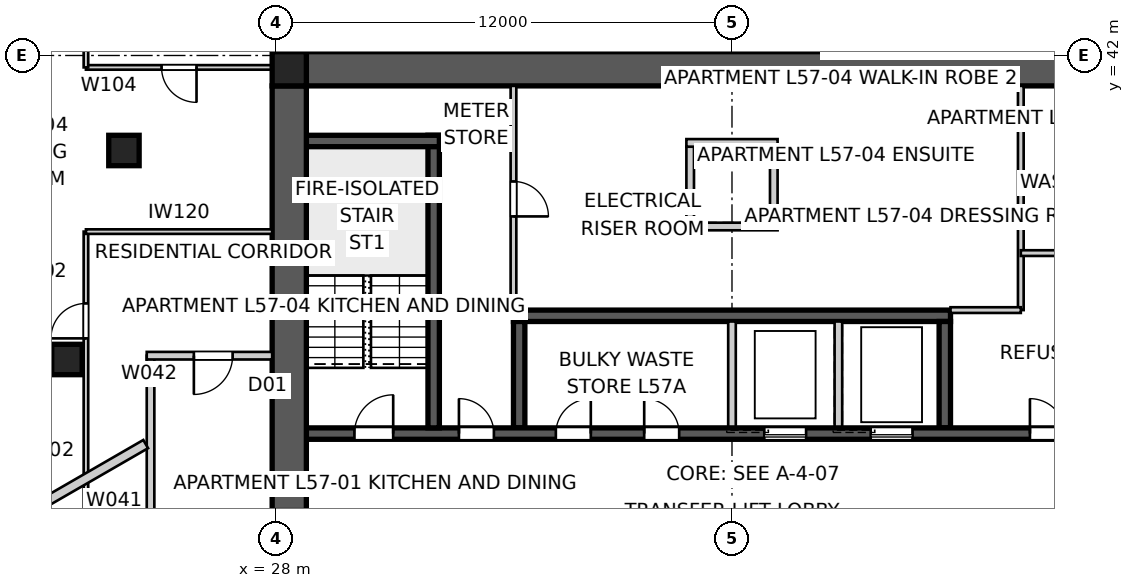
"""IFC4 building model, lengths in metres.
Left out: names, types, materials, properties, quantities, classifications, styles, units other than length and angle.
Written with IfcOpenShell. Run it as: python <this file> out.ifc"""

import sys

from ifc_helpers import new_model, si_unit, direction, frame, frame_2d, origin, origin_2d, place, context, subcontext, project, spatial, polyline, rectangle, outline, extrude, element, fill, save


model = new_model("IFC4")
c1 = context("Model", 3, precision=1e-05, world=origin(), true_north=direction((0.0, 1.0)))
c2 = subcontext(c1, "Body", "Model", "MODEL_VIEW")
j1 = project(units=[si_unit("LENGTHUNIT", "METRE"), si_unit("PLANEANGLEUNIT", "RADIAN")], contexts=[c1])
p1 = place(None, origin())
s1 = spatial("IfcSite", under=j1, at=p1, CompositionType="ELEMENT")
p2 = place(p1, origin())
s2 = spatial("IfcBuilding", under=s1, at=p2, CompositionType="ELEMENT")
p3 = place(p2, frame((0.0, 0.0, 208.2)))
s3 = spatial("IfcBuildingStorey", under=s2, at=p3, CompositionType="ELEMENT", Elevation=208.2)
p4 = place(p3, frame((28.8, 41.65, 0.0), z_axis=(0.0, 0.0, 1.0), x_axis=(1.0, 0.0, 0.0)))
e1 = element("IfcWall", 1, at=p4, inside=s3, PredefinedType="SHEAR", context=c2, shape_type="SweptSolid", body=[
    extrude(outline(polyline([(0.0, -0.45), (22.4, -0.45), (22.4, -0.025), (22.85, -0.025), (22.85, 0.025), (22.4, 0.025), (22.4, 0.45), (0.0, 0.45), (0.0, 0.025), (-0.45, 0.025), (-0.45, -0.025), (0.0, -0.025), (0.0, -0.45)])), origin(), (0.0, 0.0, 1.0), 3.4),
])
p5 = place(p3, frame((28.35, 41.2, 0.0), z_axis=(0.0, 0.0, 1.0), x_axis=(0.0, -1.0, 0.0)))
e2 = element("IfcWall", 2, at=p5, inside=s3, PredefinedType="SHEAR", context=c2, shape_type="SweptSolid", body=[
    extrude(outline(polyline([(0.0, -0.45), (22.4, -0.45), (22.4, -0.025), (22.85, -0.025), (22.85, 0.025), (22.4, 0.025), (22.4, 0.45), (0.0, 0.45), (0.0, 0.025), (-0.45, 0.025), (-0.45, -0.025), (0.0, -0.025), (0.0, -0.45)])), origin(), (0.0, 0.0, 1.0), 3.4),
])
p6 = place(p5, frame((11.14, 0.0, 0.0)))
e3 = element("IfcOpeningElement", 3, at=p6, cuts=e2, PredefinedType="OPENING", context=c2, shape_type="SweptSolid", body=[
    extrude(rectangle(XDim=1.02, YDim=2.4, at=frame_2d((0.51, 1.2))), frame((0.0, 0.46, 0.0), z_axis=(0.0, -1.0, 0.0), x_axis=(1.0, 0.0, 0.0)), (0.0, 0.0, 1.0), 0.92),
])
p7 = place(p3, frame((28.8, 32.05, 0.0), z_axis=(0.0, 0.0, 1.0), x_axis=(1.0, 0.0, 0.0)))
e4 = element("IfcWall", 4, at=p7, inside=s3, PredefinedType="SHEAR", context=c2, shape_type="SweptSolid", body=[
    extrude(rectangle(XDim=22.4, YDim=0.3, at=frame_2d((11.2, 0.0))), origin(), (0.0, 0.0, 1.0), 3.4),
])
p8 = place(p7, frame((19.04, 0.0, 0.0)))
e5 = element("IfcOpeningElement", 5, at=p8, cuts=e4, PredefinedType="OPENING", context=c2, shape_type="SweptSolid", body=[
    extrude(rectangle(XDim=0.92, YDim=2.1, at=frame_2d((0.46, 1.05))), frame((0.0, 0.16, 0.0), z_axis=(0.0, -1.0, 0.0), x_axis=(1.0, 0.0, 0.0)), (0.0, 0.0, 1.0), 0.32),
])
p9 = place(p7, frame((1.265, 0.0, 0.0)))
e6 = element("IfcOpeningElement", 6, at=p9, cuts=e4, PredefinedType="OPENING", context=c2, shape_type="SweptSolid", body=[
    extrude(rectangle(XDim=1.02, YDim=2.1, at=frame_2d((0.51, 1.05))), frame((0.0, 0.16, 0.0), z_axis=(0.0, -1.0, 0.0), x_axis=(1.0, 0.0, 0.0)), (0.0, 0.0, 1.0), 0.32),
])
p10 = place(p7, frame((4.015, 0.0, 0.0)))
e7 = element("IfcOpeningElement", 7, at=p10, cuts=e4, PredefinedType="OPENING", context=c2, shape_type="SweptSolid", body=[
    extrude(rectangle(XDim=0.92, YDim=2.1, at=frame_2d((0.46, 1.05))), frame((0.0, 0.16, 0.0), z_axis=(0.0, -1.0, 0.0), x_axis=(1.0, 0.0, 0.0)), (0.0, 0.0, 1.0), 0.32),
])
p11 = place(p7, frame((6.565, 0.0, 0.0)))
e8 = element("IfcOpeningElement", 8, at=p11, cuts=e4, PredefinedType="OPENING", context=c2, shape_type="SweptSolid", body=[
    extrude(rectangle(XDim=0.92, YDim=2.1, at=frame_2d((0.46, 1.05))), frame((0.0, 0.16, 0.0), z_axis=(0.0, -1.0, 0.0), x_axis=(1.0, 0.0, 0.0)), (0.0, 0.0, 1.0), 0.32),
])
p12 = place(p7, frame((8.89, 0.0, 0.0)))
e9 = element("IfcOpeningElement", 9, at=p12, cuts=e4, PredefinedType="OPENING", context=c2, shape_type="SweptSolid", body=[
    extrude(rectangle(XDim=0.92, YDim=2.1, at=frame_2d((0.46, 1.05))), frame((0.0, 0.16, 0.0), z_axis=(0.0, -1.0, 0.0), x_axis=(1.0, 0.0, 0.0)), (0.0, 0.0, 1.0), 0.32),
])
p13 = place(p7, frame((12.05, 0.0, 0.0)))
e10 = element("IfcOpeningElement", 10, at=p13, cuts=e4, PredefinedType="OPENING", context=c2, shape_type="SweptSolid", body=[
    extrude(rectangle(XDim=1.1, YDim=2.1, at=frame_2d((0.55, 1.05))), frame((0.0, 0.16, 0.0), z_axis=(0.0, -1.0, 0.0), x_axis=(1.0, 0.0, 0.0)), (0.0, 0.0, 1.0), 0.32),
])
p14 = place(p7, frame((14.85, 0.0, 0.0)))
e11 = element("IfcOpeningElement", 11, at=p14, cuts=e4, PredefinedType="OPENING", context=c2, shape_type="SweptSolid", body=[
    extrude(rectangle(XDim=1.1, YDim=2.1, at=frame_2d((0.55, 1.05))), frame((0.0, 0.16, 0.0), z_axis=(0.0, -1.0, 0.0), x_axis=(1.0, 0.0, 0.0)), (0.0, 0.0, 1.0), 0.32),
])
p15 = place(p3, frame((34.25, 35.15, 0.0), z_axis=(0.0, 0.0, 1.0), x_axis=(1.0, 0.0, 0.0)))
e12 = element("IfcWall", 12, at=p15, inside=s3, PredefinedType="SHEAR", context=c2, shape_type="SweptSolid", body=[
    extrude(rectangle(XDim=11.5, YDim=0.3, at=frame_2d((5.75, 0.0))), origin(), (0.0, 0.0, 1.0), 3.4),
])
p16 = place(p3, frame((34.4, 32.2, 0.0), z_axis=(0.0, 0.0, 1.0), x_axis=(0.0, 1.0, 0.0)))
e13 = element("IfcWall", 13, at=p16, inside=s3, PredefinedType="SHEAR", context=c2, shape_type="SweptSolid", body=[
    extrude(rectangle(XDim=2.8, YDim=0.3, at=frame_2d((1.4, 0.0))), origin(), (0.0, 0.0, 1.0), 3.4),
])
for number, where, z_axis, x_axis in (
    (14, (40.0, 32.2, 0.0), (0.0, 0.0, 1.0), (0.0, 1.0, 0.0)),
    (15, (42.8, 32.2, 0.0), (0.0, 0.0, 1.0), (0.0, 1.0, 0.0)),
):
    element("IfcWall", number, at=place(p3, frame(where, z_axis=z_axis, x_axis=x_axis)), inside=s3, PredefinedType="SOLIDWALL", context=c2, shape_type="SweptSolid", body=[
        extrude(rectangle(XDim=2.8, YDim=0.2, at=frame_2d((1.4, 0.0))), origin(), (0.0, 0.0, 1.0), 3.4),
    ])
p17 = place(p3, frame((45.6, 32.2, 0.0), z_axis=(0.0, 0.0, 1.0), x_axis=(0.0, 1.0, 0.0)))
e16 = element("IfcWall", 16, at=p17, inside=s3, PredefinedType="SHEAR", context=c2, shape_type="SweptSolid", body=[
    extrude(rectangle(XDim=2.8, YDim=0.3, at=frame_2d((1.4, 0.0))), origin(), (0.0, 0.0, 1.0), 3.4),
])
p18 = place(p3, frame((32.15, 32.2, 0.0), z_axis=(0.0, 0.0, 1.0), x_axis=(0.0, 1.0, 0.0)))
e17 = element("IfcWall", 17, at=p18, inside=s3, PredefinedType="SHEAR", context=c2, shape_type="SweptSolid", body=[
    extrude(rectangle(XDim=7.7, YDim=0.3, at=frame_2d((3.85, 0.0))), origin(), (0.0, 0.0, 1.0), 3.4),
])
p19 = place(p3, frame((28.8, 39.75, 0.0), z_axis=(0.0, 0.0, 1.0), x_axis=(1.0, 0.0, 0.0)))
e18 = element("IfcWall", 18, at=p19, inside=s3, PredefinedType="SHEAR", context=c2, shape_type="SweptSolid", body=[
    extrude(rectangle(XDim=3.5, YDim=0.3, at=frame_2d((1.75, 0.0))), origin(), (0.0, 0.0, 1.0), 3.4),
])
for number, where, z_axis, x_axis in (
    (19, (38.9, 37.6, 0.0), (0.0, 0.0, 1.0), (0.0, 1.0, 0.0)),
    (20, (41.1, 37.6, 0.0), (0.0, 0.0, 1.0), (0.0, 1.0, 0.0)),
):
    element("IfcWall", number, at=place(p3, frame(where, z_axis=z_axis, x_axis=x_axis)), inside=s3, PredefinedType="SOLIDWALL", context=c2, shape_type="SweptSolid", body=[
        extrude(rectangle(XDim=2.0, YDim=0.2, at=frame_2d((1.0, 0.0))), origin(), (0.0, 0.0, 1.0), 3.4),
    ])
for number, where, z_axis, x_axis in (
    (21, (38.8, 37.5, 0.0), (0.0, 0.0, 1.0), (1.0, 0.0, 0.0)),
    (22, (38.8, 39.7, 0.0), (0.0, 0.0, 1.0), (1.0, 0.0, 0.0)),
):
    element("IfcWall", number, at=place(p3, frame(where, z_axis=z_axis, x_axis=x_axis)), inside=s3, PredefinedType="SOLIDWALL", context=c2, shape_type="SweptSolid", body=[
        extrude(rectangle(XDim=2.4, YDim=0.2, at=frame_2d((1.2, 0.0))), origin(), (0.0, 0.0, 1.0), 3.4),
    ])
p20 = place(p3, frame((28.35, 41.65, 0.0), z_axis=(0.0, 0.0, 1.0), x_axis=(1.0, 0.0, 0.0)))
e23 = element("IfcColumn", 23, at=p20, inside=s3, PredefinedType="COLUMN", context=c2, shape_type="SweptSolid", body=[
    extrude(rectangle(XDim=0.9, YDim=0.9, at=origin_2d()), origin(), (0.0, 0.0, 1.0), 3.4),
])
for number, where, z_axis, x_axis in (
    (24, (24.0, 39.5, 0.0), (0.0, 0.0, 1.0), (1.0, 0.0, 0.0)),
    (25, (22.5, 34.0, 0.0), (0.0, 0.0, 1.0), (1.0, 0.0, 0.0)),
):
    element("IfcColumn", number, at=place(p3, frame(where, z_axis=z_axis, x_axis=x_axis)), inside=s3, PredefinedType="COLUMN", context=c2, shape_type="SweptSolid", body=[
        extrude(rectangle(XDim=0.8, YDim=0.8, at=origin_2d()), origin(), (0.0, 0.0, 1.0), 3.4),
    ])
p21 = place(p3, frame((24.7, 25.9, 0.0), z_axis=(0.0, 0.0, 1.0), x_axis=(0.0, 1.0, 0.0)))
e26 = element("IfcWall", 26, at=p21, inside=s3, PredefinedType="PARTITIONING", context=c2, shape_type="SweptSolid", body=[
    extrude(rectangle(XDim=8.2, YDim=0.2, at=frame_2d((4.1, 0.0))), origin(), (0.0, 0.0, 1.0), 3.25),
])
p22 = place(p21, frame((2.687, 0.0, 0.0)))
e27 = element("IfcOpeningElement", 27, at=p22, cuts=e26, PredefinedType="OPENING", context=c2, shape_type="SweptSolid", body=[
    extrude(rectangle(XDim=1.02, YDim=2.34, at=frame_2d((0.51, 1.17))), frame((0.0, 0.11, 0.0), z_axis=(0.0, -1.0, 0.0), x_axis=(1.0, 0.0, 0.0)), (0.0, 0.0, 1.0), 0.22),
])
p23 = place(p3, frame((27.9, 34.1, 0.0), z_axis=(0.0, 0.0, 1.0), x_axis=(-1.0, 0.0, 0.0)))
e28 = element("IfcWall", 28, at=p23, inside=s3, PredefinedType="PARTITIONING", context=c2, shape_type="SweptSolid", body=[
    extrude(rectangle(XDim=3.3, YDim=0.2, at=frame_2d((1.65, 0.0))), origin(), (0.0, 0.0, 1.0), 3.25),
])
p24 = place(p23, frame((1.04, 0.0, 0.0)))
e29 = element("IfcOpeningElement", 29, at=p24, cuts=e28, PredefinedType="OPENING", context=c2, shape_type="SweptSolid", body=[
    extrude(rectangle(XDim=1.02, YDim=2.34, at=frame_2d((0.51, 1.17))), frame((0.0, 0.11, 0.0), z_axis=(0.0, -1.0, 0.0), x_axis=(1.0, 0.0, 0.0)), (0.0, 0.0, 1.0), 0.22),
])
p25 = place(p3, frame((15.889, 26.761, 0.0), z_axis=(0.0, 0.0, 1.0), x_axis=(0.866024190901, 0.50000210077, 0.0)))
e30 = element("IfcWall", 30, at=p25, inside=s3, PredefinedType="PARTITIONING", context=c2, shape_type="SweptSolid", body=[
    extrude(rectangle(XDim=10.026, YDim=0.25, at=frame_2d((5.013, 0.0))), origin(), (0.0, 0.0, 1.0), 3.25),
])
p26 = place(p3, frame((34.25, 41.2, 0.0), z_axis=(0.0, 0.0, 1.0), x_axis=(0.0, -1.0, 0.0)))
e31 = element("IfcWall", 31, at=p26, inside=s3, PredefinedType="SOLIDWALL", context=c2, shape_type="SweptSolid", body=[
    extrude(rectangle(XDim=5.95, YDim=0.15, at=frame_2d((2.975, 0.0))), origin(), (0.0, 0.0, 1.0), 3.25),
])
p27 = place(p26, frame((2.515, 0.0, 0.0)))
e32 = element("IfcOpeningElement", 32, at=p27, cuts=e31, PredefinedType="OPENING", context=c2, shape_type="SweptSolid", body=[
    extrude(rectangle(XDim=0.92, YDim=2.1, at=frame_2d((0.46, 1.05))), frame((0.0, 0.085, 0.0), z_axis=(0.0, -1.0, 0.0), x_axis=(1.0, 0.0, 0.0)), (0.0, 0.0, 1.0), 0.17),
])
p28 = place(p3, frame((47.6, 41.2, 0.0), z_axis=(0.0, 0.0, 1.0), x_axis=(0.0, -1.0, 0.0)))
e33 = element("IfcWall", 33, at=p28, inside=s3, PredefinedType="SOLIDWALL", context=c2, shape_type="SweptSolid", body=[
    extrude(rectangle(XDim=5.9, YDim=0.15, at=frame_2d((2.95, 0.0))), origin(), (0.0, 0.0, 1.0), 3.25),
])
p29 = place(p3, frame((47.6, 35.3, 0.0), z_axis=(0.0, 0.0, 1.0), x_axis=(-1.0, 0.0, 0.0)))
e34 = element("IfcWall", 34, at=p29, inside=s3, PredefinedType="SOLIDWALL", context=c2, shape_type="SweptSolid", body=[
    extrude(rectangle(XDim=1.85, YDim=0.15, at=frame_2d((0.925, 0.0))), origin(), (0.0, 0.0, 1.0), 3.25),
])
p30 = place(p3, frame((47.6, 36.8, 0.0), z_axis=(0.0, 0.0, 1.0), x_axis=(1.0, 0.0, 0.0)))
e35 = element("IfcWall", 35, at=p30, inside=s3, PredefinedType="SOLIDWALL", context=c2, shape_type="SweptSolid", body=[
    extrude(rectangle(XDim=3.6, YDim=0.15, at=frame_2d((1.8, 0.0))), origin(), (0.0, 0.0, 1.0), 3.25),
])
p31 = place(p30, frame((1.34, 0.0, 0.0)))
e36 = element("IfcOpeningElement", 36, at=p31, cuts=e35, PredefinedType="OPENING", context=c2, shape_type="SweptSolid", body=[
    extrude(rectangle(XDim=0.92, YDim=2.1, at=frame_2d((0.46, 1.05))), frame((0.0, 0.085, 0.0), z_axis=(0.0, -1.0, 0.0), x_axis=(1.0, 0.0, 0.0)), (0.0, 0.0, 1.0), 0.17),
])
p32 = place(p3, frame((23.0, 20.185, 0.0), z_axis=(0.0, 0.0, 1.0), x_axis=(0.0, 1.0, 0.0)))
e37 = element("IfcWall", 37, at=p32, inside=s3, PredefinedType="PARTITIONING", context=c2, shape_type="SweptSolid", body=[
    extrude(rectangle(XDim=17.18, YDim=0.12, at=frame_2d((8.59, 0.0))), origin(), (0.0, 0.0, 1.0), 2.55),
])
p33 = place(p32, frame((7.688, 0.0, 0.0)))
e38 = element("IfcOpeningElement", 38, at=p33, cuts=e37, PredefinedType="OPENING", context=c2, shape_type="SweptSolid", body=[
    extrude(rectangle(XDim=0.92, YDim=2.34, at=frame_2d((0.46, 1.17))), frame((0.0, 0.07, 0.0), z_axis=(0.0, -1.0, 0.0), x_axis=(1.0, 0.0, 0.0)), (0.0, 0.0, 1.0), 0.14),
])
p34 = place(p32, frame((14.371, 0.0, 0.0)))
e39 = element("IfcOpeningElement", 39, at=p34, cuts=e37, PredefinedType="OPENING", context=c2, shape_type="SweptSolid", body=[
    extrude(rectangle(XDim=0.92, YDim=2.34, at=frame_2d((0.46, 1.17))), frame((0.0, 0.07, 0.0), z_axis=(0.0, -1.0, 0.0), x_axis=(1.0, 0.0, 0.0)), (0.0, 0.0, 1.0), 0.14),
])
p35 = place(p3, frame((23.0, 37.365, 0.0), z_axis=(0.0, 0.0, 1.0), x_axis=(1.0, 0.0, 0.0)))
e40 = element("IfcWall", 40, at=p35, inside=s3, PredefinedType="PARTITIONING", context=c2, shape_type="SweptSolid", body=[
    extrude(rectangle(XDim=4.9, YDim=0.12, at=frame_2d((2.45, 0.0))), origin(), (0.0, 0.0, 1.0), 3.25),
])
p36 = place(p3, frame((27.9, 41.687, 0.0), z_axis=(0.0, 0.0, 1.0), x_axis=(-1.0, 0.0, 0.0)))
e41 = element("IfcWall", 41, at=p36, inside=s3, PredefinedType="PARTITIONING", context=c2, shape_type="SweptSolid", body=[
    extrude(rectangle(XDim=4.9, YDim=0.12, at=frame_2d((2.45, 0.0))), origin(), (0.0, 0.0, 1.0), 3.25),
])
p37 = place(p36, frame((1.99, 0.0, 0.0)))
e42 = element("IfcOpeningElement", 42, at=p37, cuts=e41, PredefinedType="OPENING", context=c2, shape_type="SweptSolid", body=[
    extrude(rectangle(XDim=0.92, YDim=2.1, at=frame_2d((0.46, 1.05))), frame((0.0, 0.07, 0.0), z_axis=(0.0, -1.0, 0.0), x_axis=(1.0, 0.0, 0.0)), (0.0, 0.0, 1.0), 0.14),
])
p38 = place(p3, frame((23.0, 41.687, 0.0), z_axis=(0.0, 0.0, 1.0), x_axis=(0.0, 1.0, 0.0)))
e43 = element("IfcWall", 43, at=p38, inside=s3, PredefinedType="PARTITIONING", context=c2, shape_type="SweptSolid", body=[
    extrude(rectangle(XDim=4.433, YDim=0.12, at=frame_2d((2.216, 0.0))), origin(), (0.0, 0.0, 1.0), 3.25),
])
p39 = place(p3, frame((27.9, 41.687, 0.0), z_axis=(0.0, 0.0, 1.0), x_axis=(0.999162409553, -0.040920402453, 0.0)))
e44 = element("IfcWall", 44, at=p39, inside=s3, PredefinedType="PARTITIONING", context=c2, shape_type="SweptSolid", body=[
    extrude(rectangle(XDim=0.901, YDim=0.12, at=frame_2d((0.45, 0.0))), origin(), (0.0, 0.0, 1.0), 3.25),
])
p40 = place(p8, origin())
e45 = element("IfcDoor", 45, at=p40, inside=s3, OperationType="SINGLE_SWING_LEFT", PredefinedType="DOOR", context=c2, shape_type="SweptSolid", body=[
    extrude(rectangle(XDim=0.92, YDim=2.1, at=frame_2d((0.46, 1.05))), frame((0.0, 0.025, 0.0), z_axis=(0.0, -1.0, 0.0), x_axis=(1.0, 0.0, 0.0)), (0.0, 0.0, 1.0), 0.05),
])
fill(e5, e45)
p41 = place(p9, origin())
e46 = element("IfcDoor", 46, at=p41, inside=s3, OperationType="SINGLE_SWING_RIGHT", PredefinedType="DOOR", context=c2, shape_type="SweptSolid", body=[
    extrude(rectangle(XDim=1.02, YDim=2.1, at=frame_2d((0.51, 1.05))), frame((0.0, 0.025, 0.0), z_axis=(0.0, -1.0, 0.0), x_axis=(1.0, 0.0, 0.0)), (0.0, 0.0, 1.0), 0.05),
])
fill(e6, e46)
p42 = place(p10, origin())
e47 = element("IfcDoor", 47, at=p42, inside=s3, OperationType="SINGLE_SWING_LEFT", PredefinedType="DOOR", context=c2, shape_type="SweptSolid", body=[
    extrude(rectangle(XDim=0.92, YDim=2.1, at=frame_2d((0.46, 1.05))), frame((0.0, 0.025, 0.0), z_axis=(0.0, -1.0, 0.0), x_axis=(1.0, 0.0, 0.0)), (0.0, 0.0, 1.0), 0.05),
])
fill(e7, e47)
p43 = place(p24, origin())
e48 = element("IfcDoor", 48, at=p43, inside=s3, OperationType="SINGLE_SWING_RIGHT", PredefinedType="DOOR", context=c2, shape_type="SweptSolid", body=[
    extrude(rectangle(XDim=1.02, YDim=2.34, at=frame_2d((0.51, 1.17))), frame((0.0, 0.025, 0.0), z_axis=(0.0, -1.0, 0.0), x_axis=(1.0, 0.0, 0.0)), (0.0, 0.0, 1.0), 0.05),
])
fill(e29, e48)
p44 = place(p27, origin())
e49 = element("IfcDoor", 49, at=p44, inside=s3, OperationType="SINGLE_SWING_RIGHT", PredefinedType="DOOR", context=c2, shape_type="SweptSolid", body=[
    extrude(rectangle(XDim=0.92, YDim=2.1, at=frame_2d((0.46, 1.05))), frame((0.0, 0.025, 0.0), z_axis=(0.0, -1.0, 0.0), x_axis=(1.0, 0.0, 0.0)), (0.0, 0.0, 1.0), 0.05),
])
fill(e32, e49)
p45 = place(p34, origin())
e50 = element("IfcDoor", 50, at=p45, inside=s3, OperationType="SINGLE_SWING_LEFT", PredefinedType="DOOR", context=c2, shape_type="SweptSolid", body=[
    extrude(rectangle(XDim=0.92, YDim=2.34, at=frame_2d((0.46, 1.17))), frame((0.0, 0.025, 0.0), z_axis=(0.0, -1.0, 0.0), x_axis=(1.0, 0.0, 0.0)), (0.0, 0.0, 1.0), 0.05),
])
fill(e39, e50)
p46 = place(p37, origin())
e51 = element("IfcDoor", 51, at=p46, inside=s3, OperationType="SINGLE_SWING_LEFT", PredefinedType="DOOR", context=c2, shape_type="SweptSolid", body=[
    extrude(rectangle(XDim=0.92, YDim=2.1, at=frame_2d((0.46, 1.05))), frame((0.0, 0.025, 0.0), z_axis=(0.0, -1.0, 0.0), x_axis=(1.0, 0.0, 0.0)), (0.0, 0.0, 1.0), 0.05),
])
fill(e42, e51)
p47 = place(p11, origin())
e52 = element("IfcDoor", 52, at=p47, inside=s3, OperationType="SINGLE_SWING_RIGHT", PredefinedType="DOOR", context=c2, shape_type="SweptSolid", body=[
    extrude(rectangle(XDim=0.92, YDim=2.1, at=frame_2d((0.46, 1.05))), frame((0.0, 0.025, 0.0), z_axis=(0.0, -1.0, 0.0), x_axis=(1.0, 0.0, 0.0)), (0.0, 0.0, 1.0), 0.05),
])
fill(e8, e52)
p48 = place(p12, origin())
e53 = element("IfcDoor", 53, at=p48, inside=s3, OperationType="SINGLE_SWING_LEFT", PredefinedType="DOOR", context=c2, shape_type="SweptSolid", body=[
    extrude(rectangle(XDim=0.92, YDim=2.1, at=frame_2d((0.46, 1.05))), frame((0.0, 0.025, 0.0), z_axis=(0.0, -1.0, 0.0), x_axis=(1.0, 0.0, 0.0)), (0.0, 0.0, 1.0), 0.05),
])
fill(e9, e53)
p49 = place(p13, origin())
e54 = element("IfcDoor", 54, at=p49, inside=s3, OperationType="SLIDING_TO_LEFT", PredefinedType="DOOR", context=c2, shape_type="SweptSolid", body=[
    extrude(rectangle(XDim=1.1, YDim=2.1, at=frame_2d((0.55, 1.05))), frame((0.0, 0.025, 0.0), z_axis=(0.0, -1.0, 0.0), x_axis=(1.0, 0.0, 0.0)), (0.0, 0.0, 1.0), 0.05),
])
fill(e10, e54)
p50 = place(p14, origin())
e55 = element("IfcDoor", 55, at=p50, inside=s3, OperationType="SLIDING_TO_LEFT", PredefinedType="DOOR", context=c2, shape_type="SweptSolid", body=[
    extrude(rectangle(XDim=1.1, YDim=2.1, at=frame_2d((0.55, 1.05))), frame((0.0, 0.025, 0.0), z_axis=(0.0, -1.0, 0.0), x_axis=(1.0, 0.0, 0.0)), (0.0, 0.0, 1.0), 0.05),
])
fill(e11, e55)
save(model, sys.argv[1])
